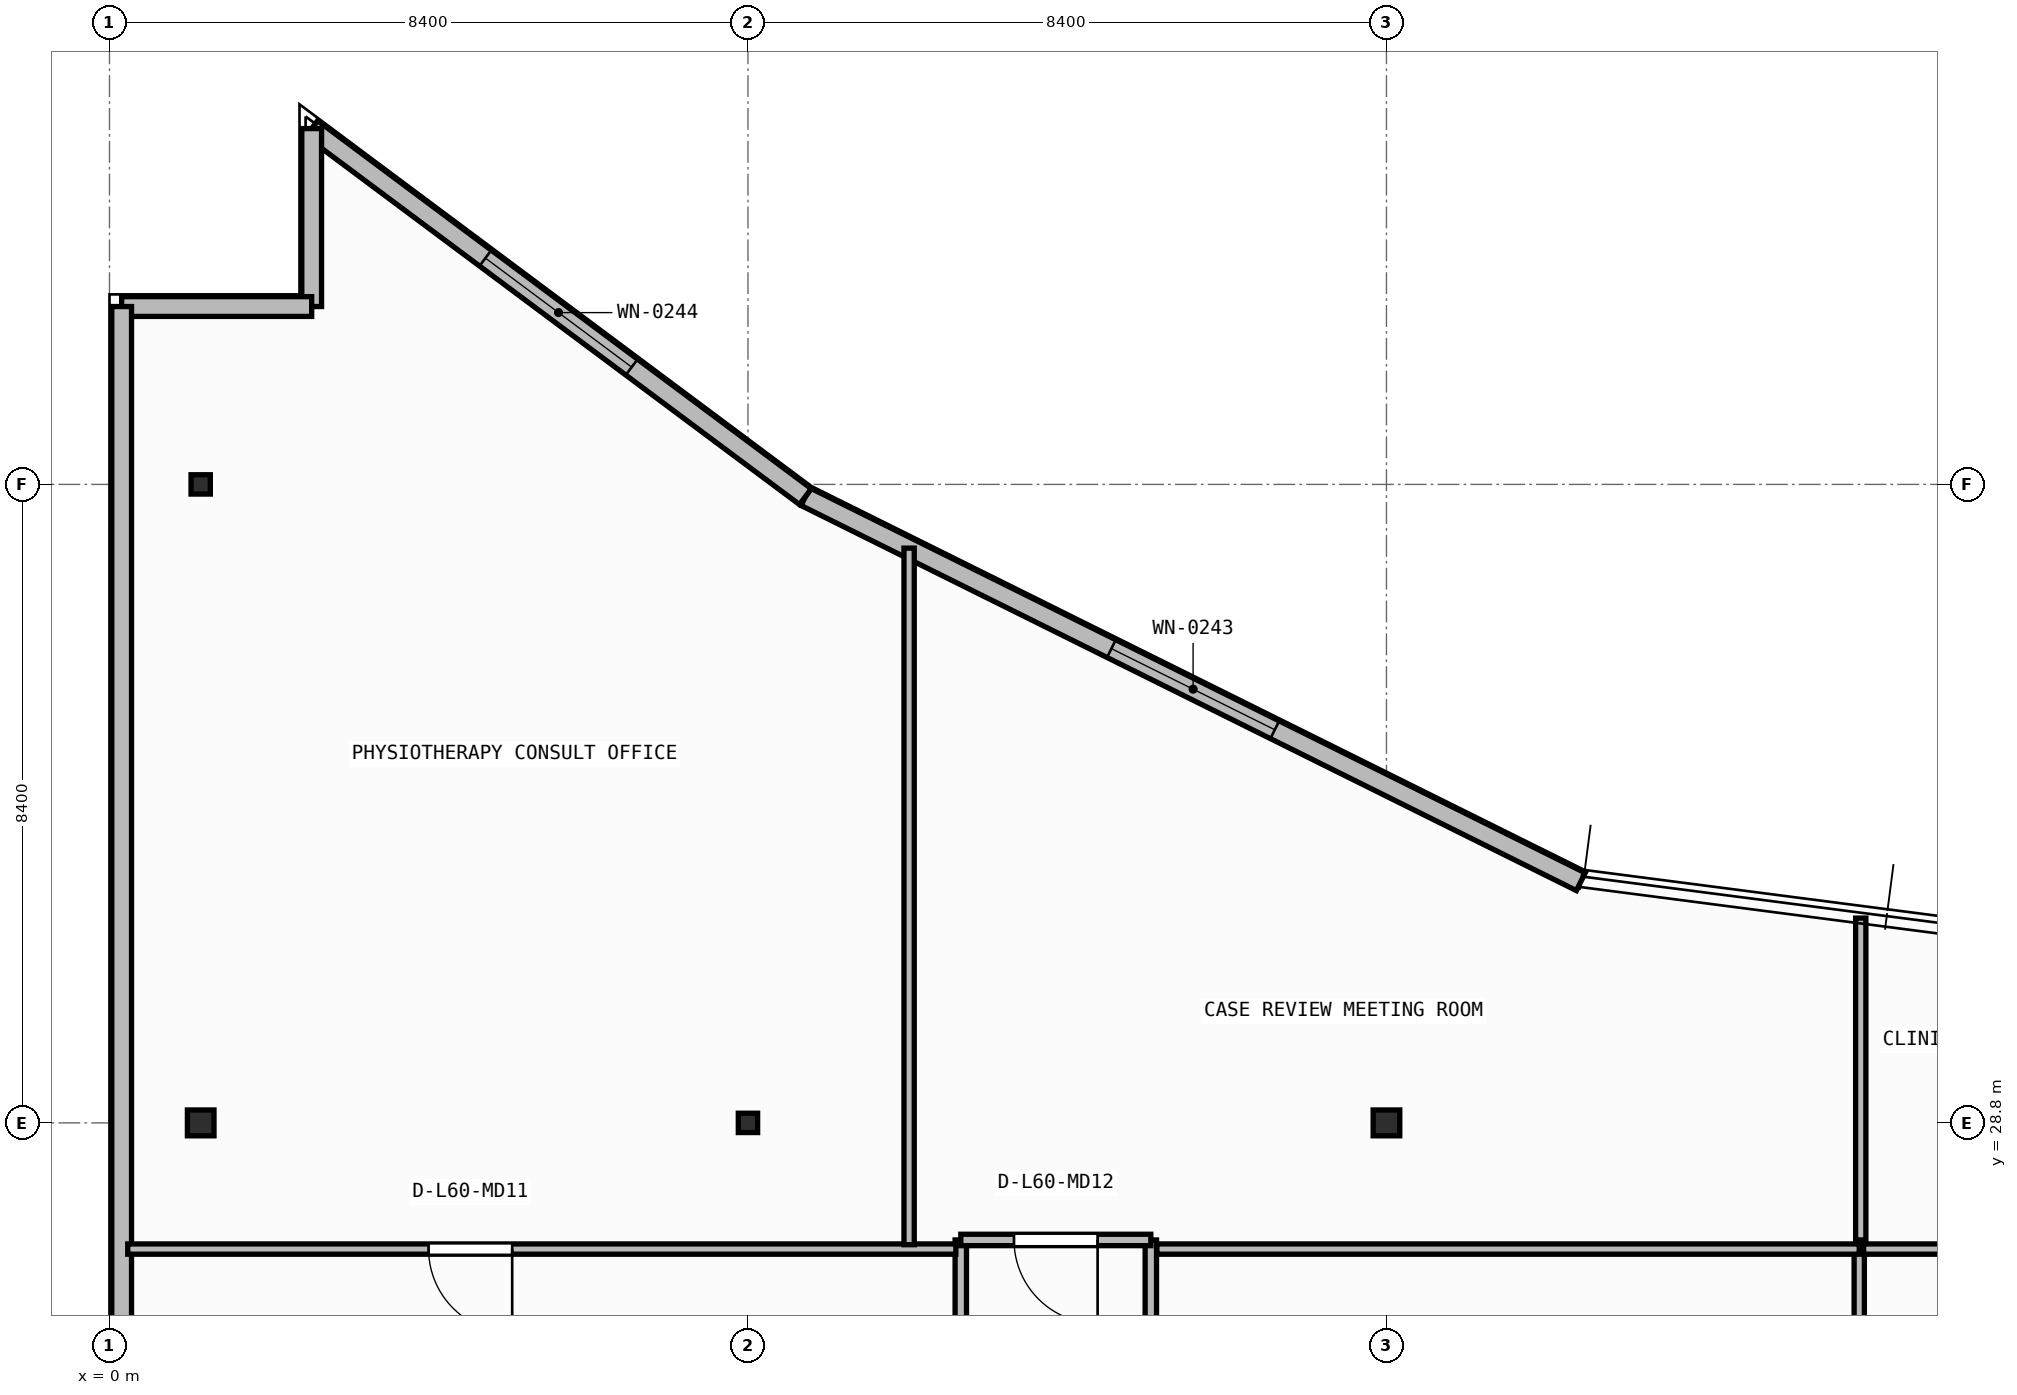
"""IFC4 building model, lengths in metres.
Left out: names, types, materials, properties, quantities, classifications, styles, units other than length and angle.
Written with IfcOpenShell. Run it as: python <this file> out.ifc"""

import sys

from ifc_helpers import new_model, si_unit, direction, frame, frame_2d, origin, origin_2d, place, context, subcontext, project, spatial, rectangle, i_section, extrude, element, fill, save


model = new_model("IFC4")
c1 = context("Model", 3, precision=1e-05, world=origin(), true_north=direction((0.0, 1.0)))
c2 = subcontext(c1, "Body", "Model", "MODEL_VIEW")
j1 = project(units=[si_unit("LENGTHUNIT", "METRE"), si_unit("PLANEANGLEUNIT", "RADIAN")], contexts=[c1])
p1 = place(None, origin())
s1 = spatial("IfcSite", under=j1, at=p1, CompositionType="ELEMENT")
p2 = place(p1, origin())
s2 = spatial("IfcBuilding", under=s1, at=p2, CompositionType="ELEMENT")
p3 = place(p2, frame((0.0, 0.0, 244.7)))
s3 = spatial("IfcBuildingStorey", under=s2, at=p3, CompositionType="ELEMENT", Elevation=244.7)
p4 = place(p3, frame((1.2, 28.8, 0.0), z_axis=(0.0, 0.0, 1.0), x_axis=(1.0, 0.0, 0.0)))
e1 = element("IfcColumn", 1, at=p4, inside=s3, PredefinedType="COLUMN", context=c2, shape_type="SweptSolid", body=[
    extrude(i_section(OverallWidth=0.35, OverallDepth=0.34, WebThickness=0.016, FlangeThickness=0.028, at=origin_2d()), origin(), (0.0, 0.0, 1.0), 3.95),
])
p5 = place(p3, frame((8.4, 28.8, 0.0), z_axis=(0.0, 0.0, 1.0), x_axis=(1.0, 0.0, 0.0)))
e2 = element("IfcColumn", 2, at=p5, inside=s3, PredefinedType="COLUMN", context=c2, shape_type="SweptSolid", body=[
    extrude(i_section(OverallWidth=0.254, OverallDepth=0.254, WebThickness=0.009, FlangeThickness=0.014, FilletRadius=0.013, at=origin_2d()), origin(), (0.0, 0.0, 1.0), 3.95),
])
p6 = place(p3, frame((16.8, 28.8, 0.0), z_axis=(0.0, 0.0, 1.0), x_axis=(1.0, 0.0, 0.0)))
e3 = element("IfcColumn", 3, at=p6, inside=s3, PredefinedType="COLUMN", context=c2, shape_type="SweptSolid", body=[
    extrude(i_section(OverallWidth=0.35, OverallDepth=0.34, WebThickness=0.016, FlangeThickness=0.028, at=origin_2d()), origin(), (0.0, 0.0, 1.0), 3.95),
])
p7 = place(p3, frame((1.2, 37.2, 0.0), z_axis=(0.0, 0.0, 1.0), x_axis=(1.0, 0.0, 0.0)))
e4 = element("IfcColumn", 4, at=p7, inside=s3, PredefinedType="COLUMN", context=c2, shape_type="SweptSolid", body=[
    extrude(i_section(OverallWidth=0.254, OverallDepth=0.254, WebThickness=0.009, FlangeThickness=0.014, FilletRadius=0.013, at=origin_2d()), origin(), (0.0, 0.0, 1.0), 3.95),
])
p8 = place(p3, frame((19.357, 31.973, 0.0), z_axis=(0.0, 0.0, 1.0), x_axis=(-0.895624365378, 0.444811191565, 0.0)))
e5 = element("IfcWall", 5, at=p8, inside=s3, PredefinedType="STANDARD", context=c2, shape_type="SweptSolid", body=[
    extrude(rectangle(XDim=11.389, YDim=0.26, at=frame_2d((5.695, 0.0))), origin(), (0.0, 0.0, 1.0), 3.71),
])
p9 = place(p8, frame((4.495, 0.0, 0.9)))
e6 = element("IfcOpeningElement", 6, at=p9, cuts=e5, PredefinedType="OPENING", context=c2, shape_type="SweptSolid", body=[
    extrude(rectangle(XDim=2.4, YDim=1.65, at=frame_2d((1.2, 0.825))), frame((0.0, 0.14, 0.0), z_axis=(0.0, -1.0, 0.0), x_axis=(1.0, 0.0, 0.0)), (0.0, 0.0, 1.0), 0.28),
])
p10 = place(p3, frame((9.156, 37.039, 0.0), z_axis=(0.0, 0.0, 1.0), x_axis=(-0.801775528243, 0.597625302602, 0.0)))
e7 = element("IfcWall", 7, at=p10, inside=s3, PredefinedType="STANDARD", context=c2, shape_type="SweptSolid", body=[
    extrude(rectangle(XDim=8.102, YDim=0.26, at=frame_2d((4.051, 0.0))), origin(), (0.0, 0.0, 1.0), 3.71),
])
p11 = place(p10, frame((2.851, 0.0, 0.9)))
e8 = element("IfcOpeningElement", 8, at=p11, cuts=e7, PredefinedType="OPENING", context=c2, shape_type="SweptSolid", body=[
    extrude(rectangle(XDim=2.4, YDim=1.65, at=frame_2d((1.2, 0.825))), frame((0.0, 0.14, 0.0), z_axis=(0.0, -1.0, 0.0), x_axis=(1.0, 0.0, 0.0)), (0.0, 0.0, 1.0), 0.28),
])
p12 = place(p3, frame((2.66, 41.881, 0.0), z_axis=(0.0, 0.0, 1.0), x_axis=(0.0, -1.0, 0.0)))
e9 = element("IfcWall", 9, at=p12, inside=s3, PredefinedType="STANDARD", context=c2, shape_type="SweptSolid", body=[
    extrude(rectangle(XDim=2.341, YDim=0.26, at=frame_2d((1.17, 0.0))), origin(), (0.0, 0.0, 1.0), 3.71),
])
p13 = place(p3, frame((2.66, 39.54, 0.0), z_axis=(0.0, 0.0, 1.0), x_axis=(-1.0, 0.0, 0.0)))
e10 = element("IfcWall", 10, at=p13, inside=s3, PredefinedType="STANDARD", context=c2, shape_type="SweptSolid", body=[
    extrude(rectangle(XDim=2.5, YDim=0.26, at=frame_2d((1.25, 0.0))), origin(), (0.0, 0.0, 1.0), 3.71),
])
p14 = place(p3, frame((0.16, 39.54, 0.0), z_axis=(0.0, 0.0, 1.0), x_axis=(0.0, -1.0, 0.0)))
e11 = element("IfcWall", 11, at=p14, inside=s3, PredefinedType="STANDARD", context=c2, shape_type="SweptSolid", body=[
    extrude(rectangle(XDim=36.88, YDim=0.26, at=frame_2d((18.44, 0.0))), origin(), (0.0, 0.0, 1.0), 3.71),
])
p15 = place(p14, frame((26.625, 0.0, 0.9)))
e12 = element("IfcOpeningElement", 12, at=p15, cuts=e11, PredefinedType="OPENING", context=c2, shape_type="SweptSolid", body=[
    extrude(rectangle(XDim=2.4, YDim=1.65, at=frame_2d((1.2, 0.825))), frame((0.0, 0.14, 0.0), z_axis=(0.0, -1.0, 0.0), x_axis=(1.0, 0.0, 0.0)), (0.0, 0.0, 1.0), 0.28),
])
p16 = place(p3, frame((11.2, 27.26, 0.0), z_axis=(0.0, 0.0, 1.0), x_axis=(0.0, -1.0, 0.0)))
e13 = element("IfcWall", 13, at=p16, inside=s3, PredefinedType="PARTITIONING", context=c2, shape_type="SweptSolid", body=[
    extrude(rectangle(XDim=6.242, YDim=0.15, at=frame_2d((3.121, 0.0))), origin(), (0.0, 0.0, 1.0), 3.71),
])
p17 = place(p16, frame((2.571, 0.0, 0.0)))
e14 = element("IfcOpeningElement", 14, at=p17, cuts=e13, PredefinedType="OPENING", context=c2, shape_type="SweptSolid", body=[
    extrude(rectangle(XDim=1.1, YDim=2.1, at=frame_2d((0.55, 1.05))), frame((0.0, 0.085, 0.0), z_axis=(0.0, -1.0, 0.0), x_axis=(1.0, 0.0, 0.0)), (0.0, 0.0, 1.0), 0.17),
])
p18 = place(p3, frame((13.7, 21.018, 0.0), z_axis=(0.0, 0.0, 1.0), x_axis=(0.0, 1.0, 0.0)))
e15 = element("IfcWall", 15, at=p18, inside=s3, PredefinedType="PARTITIONING", context=c2, shape_type="SweptSolid", body=[
    extrude(rectangle(XDim=6.242, YDim=0.15, at=frame_2d((3.121, 0.0))), origin(), (0.0, 0.0, 1.0), 3.71),
])
p19 = place(p18, frame((2.571, 0.0, 0.0)))
e16 = element("IfcOpeningElement", 16, at=p19, cuts=e15, PredefinedType="OPENING", context=c2, shape_type="SweptSolid", body=[
    extrude(rectangle(XDim=1.1, YDim=2.1, at=frame_2d((0.55, 1.05))), frame((0.0, 0.085, 0.0), z_axis=(0.0, -1.0, 0.0), x_axis=(1.0, 0.0, 0.0)), (0.0, 0.0, 1.0), 0.17),
])
p20 = place(p3, frame((13.7, 27.26, 0.0), z_axis=(0.0, 0.0, 1.0), x_axis=(-1.0, 0.0, 0.0)))
e17 = element("IfcWall", 17, at=p20, inside=s3, PredefinedType="PARTITIONING", context=c2, shape_type="SweptSolid", body=[
    extrude(rectangle(XDim=2.5, YDim=0.15, at=frame_2d((1.25, 0.0))), origin(), (0.0, 0.0, 1.0), 3.71),
])
p21 = place(p20, frame((0.7, 0.0, 0.0)))
e18 = element("IfcOpeningElement", 18, at=p21, cuts=e17, PredefinedType="OPENING", context=c2, shape_type="SweptSolid", body=[
    extrude(rectangle(XDim=1.1, YDim=2.1, at=frame_2d((0.55, 1.05))), frame((0.0, 0.085, 0.0), z_axis=(0.0, -1.0, 0.0), x_axis=(1.0, 0.0, 0.0)), (0.0, 0.0, 1.0), 0.17),
])
p22 = place(p3, frame((11.135, 27.14, 0.0), z_axis=(0.0, 0.0, 1.0), x_axis=(-1.0, 0.0, 0.0)))
e19 = element("IfcWall", 19, at=p22, inside=s3, PredefinedType="PARTITIONING", context=c2, shape_type="SweptSolid", body=[
    extrude(rectangle(XDim=10.895, YDim=0.135, at=frame_2d((5.448, 0.0))), origin(), (0.0, 0.0, 1.0), 3.71),
])
p23 = place(p22, frame((5.837, 0.0, 0.0)))
e20 = element("IfcOpeningElement", 20, at=p23, cuts=e19, PredefinedType="OPENING", context=c2, shape_type="SweptSolid", body=[
    extrude(rectangle(XDim=1.1, YDim=2.1, at=frame_2d((0.55, 1.05))), frame((0.0, 0.077, 0.0), z_axis=(0.0, -1.0, 0.0), x_axis=(1.0, 0.0, 0.0)), (0.0, 0.0, 1.0), 0.155),
])
p24 = place(p3, frame((23.02, 20.847, 0.0), z_axis=(0.0, 0.0, 1.0), x_axis=(0.0, 1.0, 0.0)))
e21 = element("IfcWall", 21, at=p24, inside=s3, PredefinedType="PARTITIONING", context=c2, shape_type="SweptSolid", body=[
    extrude(rectangle(XDim=6.292, YDim=0.135, at=frame_2d((3.146, 0.0))), origin(), (0.0, 0.0, 1.0), 3.71),
])
p25 = place(p3, frame((23.02, 27.14, 0.0), z_axis=(0.0, 0.0, 1.0), x_axis=(-1.0, 0.0, 0.0)))
e22 = element("IfcWall", 22, at=p25, inside=s3, PredefinedType="PARTITIONING", context=c2, shape_type="SweptSolid", body=[
    extrude(rectangle(XDim=9.24, YDim=0.135, at=frame_2d((4.62, 0.0))), origin(), (0.0, 0.0, 1.0), 3.71),
])
p26 = place(p3, frame((33.86, 27.14, 0.0), z_axis=(0.0, 0.0, 1.0), x_axis=(-1.0, 0.0, 0.0)))
e23 = element("IfcWall", 23, at=p26, inside=s3, PredefinedType="PARTITIONING", context=c2, shape_type="SweptSolid", body=[
    extrude(rectangle(XDim=10.783, YDim=0.135, at=frame_2d((5.391, 0.0))), origin(), (0.0, 0.0, 1.0), 3.71),
])
p27 = place(p26, frame((3.913, 0.0, 0.0)))
e24 = element("IfcOpeningElement", 24, at=p27, cuts=e23, PredefinedType="OPENING", context=c2, shape_type="SweptSolid", body=[
    extrude(rectangle(XDim=1.1, YDim=2.1, at=frame_2d((0.55, 1.05))), frame((0.0, 0.077, 0.0), z_axis=(0.0, -1.0, 0.0), x_axis=(1.0, 0.0, 0.0)), (0.0, 0.0, 1.0), 0.155),
])
p28 = place(p3, frame((10.52, 27.198, 0.0), z_axis=(0.0, 0.0, 1.0), x_axis=(0.0, 1.0, 0.0)))
e25 = element("IfcWall", 25, at=p28, inside=s3, PredefinedType="PARTITIONING", context=c2, shape_type="SweptSolid", body=[
    extrude(rectangle(XDim=9.164, YDim=0.135, at=frame_2d((4.582, 0.0))), origin(), (0.0, 0.0, 1.0), 3.71),
])
p29 = place(p3, frame((23.04, 27.26, 0.0), z_axis=(0.0, 0.0, 1.0), x_axis=(0.0, 1.0, 0.0)))
e26 = element("IfcWall", 26, at=p29, inside=s3, PredefinedType="PARTITIONING", context=c2, shape_type="SweptSolid", body=[
    extrude(rectangle(XDim=4.234, YDim=0.135, at=frame_2d((2.117, 0.0))), origin(), (0.0, 0.0, 1.0), 3.71),
])
p30 = place(p9, origin())
e27 = element("IfcWindow", 27, at=p30, inside=s3, PartitioningType="SINGLE_PANEL", PredefinedType="WINDOW", context=c2, shape_type="SweptSolid", body=[
    extrude(rectangle(XDim=2.4, YDim=1.65, at=frame_2d((1.2, 0.825))), frame((0.0, 0.03, 0.0), z_axis=(0.0, -1.0, 0.0), x_axis=(1.0, 0.0, 0.0)), (0.0, 0.0, 1.0), 0.06),
])
fill(e6, e27)
p31 = place(p11, origin())
e28 = element("IfcWindow", 28, at=p31, inside=s3, PartitioningType="SINGLE_PANEL", PredefinedType="WINDOW", context=c2, shape_type="SweptSolid", body=[
    extrude(rectangle(XDim=2.4, YDim=1.65, at=frame_2d((1.2, 0.825))), frame((0.0, 0.03, 0.0), z_axis=(0.0, -1.0, 0.0), x_axis=(1.0, 0.0, 0.0)), (0.0, 0.0, 1.0), 0.06),
])
fill(e8, e28)
p32 = place(p21, origin())
e29 = element("IfcDoor", 29, at=p32, inside=s3, OperationType="SINGLE_SWING_LEFT", PredefinedType="DOOR", context=c2, shape_type="SweptSolid", body=[
    extrude(rectangle(XDim=1.1, YDim=2.1, at=frame_2d((0.55, 1.05))), frame((0.0, 0.025, 0.0), z_axis=(0.0, -1.0, 0.0), x_axis=(1.0, 0.0, 0.0)), (0.0, 0.0, 1.0), 0.05),
])
fill(e18, e29)
p33 = place(p23, origin())
e30 = element("IfcDoor", 30, at=p33, inside=s3, OperationType="SINGLE_SWING_LEFT", PredefinedType="DOOR", context=c2, shape_type="SweptSolid", body=[
    extrude(rectangle(XDim=1.1, YDim=2.1, at=frame_2d((0.55, 1.05))), frame((0.0, 0.025, 0.0), z_axis=(0.0, -1.0, 0.0), x_axis=(1.0, 0.0, 0.0)), (0.0, 0.0, 1.0), 0.05),
])
fill(e20, e30)
save(model, sys.argv[1])
